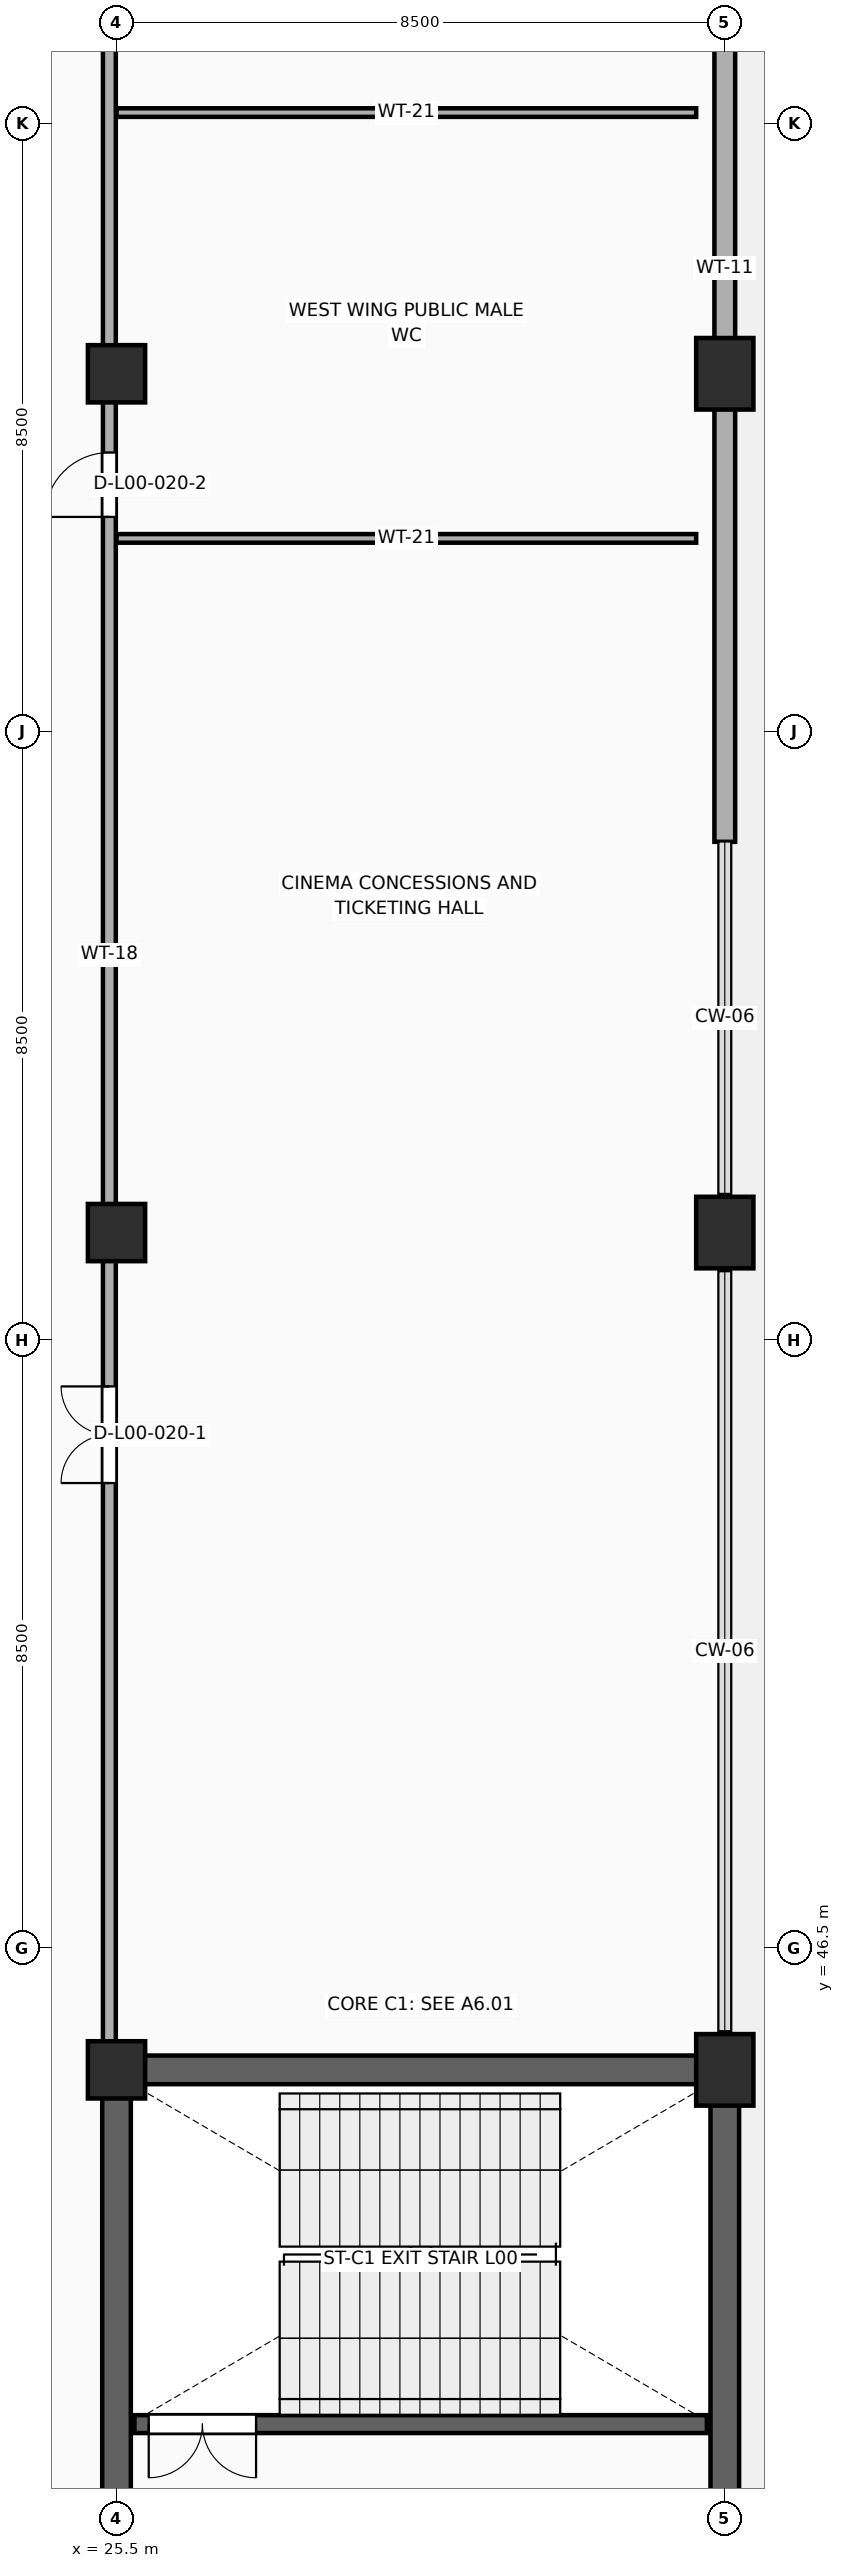
"""IFC4 building model, lengths in metres.
Left out: names, types, materials, properties, quantities, classifications, styles, units other than length and angle.
Written with IfcOpenShell. Run it as: python <this file> out.ifc"""

import sys

from ifc_helpers import new_model, si_unit, direction, frame, frame_2d, origin, origin_2d, place, context, subcontext, project, spatial, rectangle, extrude, element, fill, save


model = new_model("IFC4")
c1 = context("Model", 3, precision=1e-05, world=origin(), true_north=direction((0.0, 1.0)))
c2 = subcontext(c1, "Body", "Model", "MODEL_VIEW")
j1 = project(units=[si_unit("LENGTHUNIT", "METRE"), si_unit("PLANEANGLEUNIT", "RADIAN")], contexts=[c1])
p1 = place(None, origin())
s1 = spatial("IfcSite", under=j1, at=p1, CompositionType="ELEMENT")
p2 = place(p1, origin())
s2 = spatial("IfcBuilding", under=s1, at=p2, CompositionType="ELEMENT")
p3 = place(p2, origin())
s3 = spatial("IfcBuildingStorey", under=s2, at=p3, CompositionType="ELEMENT", Elevation=0.0)
p4 = place(p3, frame((25.5, 32.0, 0.0), z_axis=(0.0, 0.0, 1.0), x_axis=(0.0, 1.0, 0.0)))
e1 = element("IfcWall", 1, at=p4, inside=s3, PredefinedType="SHEAR", context=c2, shape_type="SweptSolid", body=[
    extrude(rectangle(XDim=12.8, YDim=0.4, at=frame_2d((6.4, 0.0))), origin(), (0.0, 0.0, 1.0), 5.24),
])
p5 = place(p4, frame((1.25, 0.0, 0.0)))
e2 = element("IfcOpeningElement", 2, at=p5, cuts=e1, PredefinedType="OPENING", context=c2, shape_type="SweptSolid", body=[
    extrude(rectangle(XDim=1.05, YDim=2.15, at=frame_2d((0.525, 1.075))), frame((0.0, 0.212, 0.0), z_axis=(0.0, -1.0, 0.0), x_axis=(1.0, 0.0, 0.0)), (0.0, 0.0, 1.0), 0.424),
])
p6 = place(p3, frame((34.0, 32.0, 0.0), z_axis=(0.0, 0.0, 1.0), x_axis=(0.0, 1.0, 0.0)))
e3 = element("IfcWall", 3, at=p6, inside=s3, PredefinedType="SHEAR", context=c2, shape_type="SweptSolid", body=[
    extrude(rectangle(XDim=12.8, YDim=0.4, at=frame_2d((6.4, 0.0))), origin(), (0.0, 0.0, 1.0), 5.24),
])
p7 = place(p3, frame((25.7, 44.8, 0.0), z_axis=(0.0, 0.0, 1.0), x_axis=(1.0, 0.0, 0.0)))
e4 = element("IfcWall", 4, at=p7, inside=s3, PredefinedType="SHEAR", context=c2, shape_type="SweptSolid", body=[
    extrude(rectangle(XDim=8.1, YDim=0.4, at=frame_2d((4.05, 0.0))), origin(), (0.0, 0.0, 1.0), 5.24),
])
p8 = place(p3, frame((25.75, 39.85, 0.0), z_axis=(0.0, 0.0, 1.0), x_axis=(1.0, 0.0, 0.0)))
e5 = element("IfcWall", 5, at=p8, inside=s3, PredefinedType="STANDARD", context=c2, shape_type="SweptSolid", body=[
    extrude(rectangle(XDim=8.0, YDim=0.25, at=frame_2d((4.0, 0.0))), origin(), (0.0, 0.0, 1.0), 5.24),
])
p9 = place(p8, frame((0.2, 0.0, 0.0)))
e6 = element("IfcOpeningElement", 6, at=p9, cuts=e5, PredefinedType="OPENING", context=c2, shape_type="SweptSolid", body=[
    extrude(rectangle(XDim=1.5, YDim=2.2, at=frame_2d((0.75, 1.1))), frame((0.0, 0.137, 0.0), z_axis=(0.0, -1.0, 0.0), x_axis=(1.0, 0.0, 0.0)), (0.0, 0.0, 1.0), 0.274),
])
for number, where, z_axis, x_axis in (
    (7, (25.5, 44.8, 0.0), (0.0, 0.0, 1.0), (1.0, 0.0, 0.0)),
    (8, (25.5, 56.5, 0.0), (0.0, 0.0, 1.0), (1.0, 0.0, 0.0)),
    (9, (25.5, 68.5, 0.0), (0.0, 0.0, 1.0), (1.0, 0.0, 0.0)),
):
    element("IfcColumn", number, at=place(p3, frame(where, z_axis=z_axis, x_axis=x_axis)), inside=s3, PredefinedType="COLUMN", context=c2, shape_type="SweptSolid", body=[
        extrude(rectangle(XDim=0.8, YDim=0.8, at=origin_2d()), origin(), (0.0, 0.0, 1.0), 5.14),
    ])
for number, where, z_axis, x_axis in (
    (10, (34.0, 44.8, 0.0), (0.0, 0.0, 1.0), (1.0, 0.0, 0.0)),
    (11, (34.0, 56.5, 0.0), (0.0, 0.0, 1.0), (1.0, 0.0, 0.0)),
    (12, (34.0, 68.5, 0.0), (0.0, 0.0, 1.0), (1.0, 0.0, 0.0)),
):
    element("IfcColumn", number, at=place(p3, frame(where, z_axis=z_axis, x_axis=x_axis)), inside=s3, PredefinedType="COLUMN", context=c2, shape_type="SweptSolid", body=[
        extrude(rectangle(XDim=0.8, YDim=1.0, at=origin_2d()), origin(), (0.0, 0.0, 1.0), 5.14),
    ])
p10 = place(p3, frame((34.0, 61.96, 0.0), z_axis=(0.0, 0.0, 1.0), x_axis=(0.0, 1.0, 0.0)))
e13 = element("IfcWall", 13, at=p10, inside=s3, PredefinedType="STANDARD", context=c2, shape_type="SweptSolid", body=[
    extrude(rectangle(XDim=34.08, YDim=0.29, at=frame_2d((17.04, 0.0))), origin(), (0.0, 0.0, 1.0), 4.28),
])
p11 = place(p10, frame((22.04, 0.0, 0.0)))
e14 = element("IfcOpeningElement", 14, at=p11, cuts=e13, PredefinedType="OPENING", context=c2, shape_type="SweptSolid", body=[
    extrude(rectangle(XDim=2.0, YDim=2.4, at=frame_2d((1.0, 1.2))), frame((0.0, 0.157, 0.0), z_axis=(0.0, -1.0, 0.0), x_axis=(1.0, 0.0, 0.0)), (0.0, 0.0, 1.0), 0.314),
])
p12 = place(p10, frame((11.58, 0.0, 1.0)))
e15 = element("IfcOpeningElement", 15, at=p12, cuts=e13, PredefinedType="OPENING", context=c2, shape_type="SweptSolid", body=[
    extrude(rectangle(XDim=2.4, YDim=1.8, at=frame_2d((1.2, 0.9))), frame((0.0, 0.157, 0.0), z_axis=(0.0, -1.0, 0.0), x_axis=(1.0, 0.0, 0.0)), (0.0, 0.0, 1.0), 0.314),
])
p13 = place(p10, frame((28.62, 0.0, 1.0)))
e16 = element("IfcOpeningElement", 16, at=p13, cuts=e13, PredefinedType="OPENING", context=c2, shape_type="SweptSolid", body=[
    extrude(rectangle(XDim=2.4, YDim=1.8, at=frame_2d((1.2, 0.9))), frame((0.0, 0.157, 0.0), z_axis=(0.0, -1.0, 0.0), x_axis=(1.0, 0.0, 0.0)), (0.0, 0.0, 1.0), 0.314),
])
p14 = place(p3, frame((25.4, 45.0, 0.0), z_axis=(0.0, 0.0, 1.0), x_axis=(0.0, 1.0, 0.0)))
e17 = element("IfcWall", 17, at=p14, inside=s3, PredefinedType="PARTITIONING", context=c2, shape_type="SweptSolid", body=[
    extrude(rectangle(XDim=35.2, YDim=0.18, at=frame_2d((17.6, 0.0))), origin(), (0.0, 0.0, 1.0), 4.03),
])
p15 = place(p14, frame((8.0, 0.0, 0.0)))
e18 = element("IfcOpeningElement", 18, at=p15, cuts=e17, PredefinedType="OPENING", context=c2, shape_type="SweptSolid", body=[
    extrude(rectangle(XDim=1.35, YDim=2.25, at=frame_2d((0.675, 1.125))), frame((0.0, 0.102, 0.0), z_axis=(0.0, -1.0, 0.0), x_axis=(1.0, 0.0, 0.0)), (0.0, 0.0, 1.0), 0.204),
])
p16 = place(p14, frame((21.5, 0.0, 0.0)))
e19 = element("IfcOpeningElement", 19, at=p16, cuts=e17, PredefinedType="OPENING", context=c2, shape_type="SweptSolid", body=[
    extrude(rectangle(XDim=0.9, YDim=2.15, at=frame_2d((0.45, 1.075))), frame((0.0, 0.102, 0.0), z_axis=(0.0, -1.0, 0.0), x_axis=(1.0, 0.0, 0.0)), (0.0, 0.0, 1.0), 0.204),
])
p17 = place(p14, frame((28.5, 0.0, 0.0)))
e20 = element("IfcOpeningElement", 20, at=p17, cuts=e17, PredefinedType="OPENING", context=c2, shape_type="SweptSolid", body=[
    extrude(rectangle(XDim=0.9, YDim=2.15, at=frame_2d((0.45, 1.075))), frame((0.0, 0.102, 0.0), z_axis=(0.0, -1.0, 0.0), x_axis=(1.0, 0.0, 0.0)), (0.0, 0.0, 1.0), 0.204),
])
p18 = place(p14, frame((33.2, 0.0, 0.0)))
e21 = element("IfcOpeningElement", 21, at=p18, cuts=e17, PredefinedType="OPENING", context=c2, shape_type="SweptSolid", body=[
    extrude(rectangle(XDim=0.95, YDim=2.15, at=frame_2d((0.475, 1.075))), frame((0.0, 0.102, 0.0), z_axis=(0.0, -1.0, 0.0), x_axis=(1.0, 0.0, 0.0)), (0.0, 0.0, 1.0), 0.204),
])
p19 = place(p3, frame((25.5, 66.2, 0.0), z_axis=(0.0, 0.0, 1.0), x_axis=(1.0, 0.0, 0.0)))
e22 = element("IfcWall", 22, at=p19, inside=s3, PredefinedType="PARTITIONING", context=c2, shape_type="SweptSolid", body=[
    extrude(rectangle(XDim=8.1, YDim=0.12, at=frame_2d((4.05, 0.0))), origin(), (0.0, 0.0, 1.0), 4.48),
])
p20 = place(p3, frame((25.5, 72.15, 0.0), z_axis=(0.0, 0.0, 1.0), x_axis=(1.0, 0.0, 0.0)))
e23 = element("IfcWall", 23, at=p20, inside=s3, PredefinedType="PARTITIONING", context=c2, shape_type="SweptSolid", body=[
    extrude(rectangle(XDim=8.1, YDim=0.12, at=frame_2d((4.05, 0.0))), origin(), (0.0, 0.0, 1.0), 4.43),
])
p21 = place(p9, frame((1.5, 0.0, 0.0), z_axis=(0.0, 0.0, 1.0), x_axis=(-1.0, 0.0, 0.0)))
e24 = element("IfcDoor", 24, at=p21, inside=s3, OperationType="DOUBLE_DOOR_SINGLE_SWING", PredefinedType="DOOR", context=c2, shape_type="SweptSolid", body=[
    extrude(rectangle(XDim=1.5, YDim=2.2, at=frame_2d((0.75, 1.1))), frame((0.0, 0.025, 0.0), z_axis=(0.0, -1.0, 0.0), x_axis=(1.0, 0.0, 0.0)), (0.0, 0.0, 1.0), 0.05),
])
fill(e6, e24)
p22 = place(p15, origin())
e25 = element("IfcDoor", 25, at=p22, inside=s3, OperationType="DOUBLE_DOOR_SINGLE_SWING", PredefinedType="DOOR", context=c2, shape_type="SweptSolid", body=[
    extrude(rectangle(XDim=1.35, YDim=2.25, at=frame_2d((0.675, 1.125))), frame((0.0, 0.025, 0.0), z_axis=(0.0, -1.0, 0.0), x_axis=(1.0, 0.0, 0.0)), (0.0, 0.0, 1.0), 0.05),
])
fill(e18, e25)
p23 = place(p16, origin())
e26 = element("IfcDoor", 26, at=p23, inside=s3, OperationType="SINGLE_SWING_LEFT", PredefinedType="DOOR", context=c2, shape_type="SweptSolid", body=[
    extrude(rectangle(XDim=0.9, YDim=2.15, at=frame_2d((0.45, 1.075))), frame((0.0, 0.025, 0.0), z_axis=(0.0, -1.0, 0.0), x_axis=(1.0, 0.0, 0.0)), (0.0, 0.0, 1.0), 0.05),
])
fill(e19, e26)
save(model, sys.argv[1])
